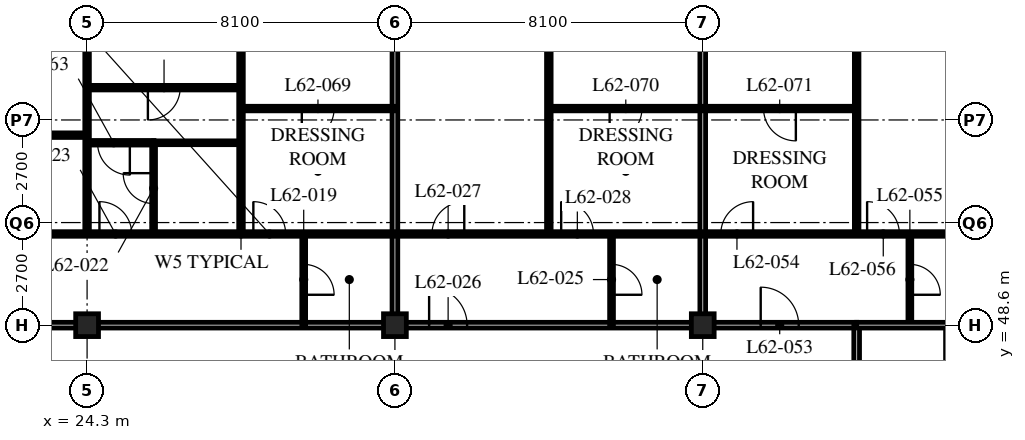
"""IFC4 building model, lengths in metres.
Left out: names, types, materials, properties, quantities, classifications, styles, units other than length and angle.
Written with IfcOpenShell. Run it as: python <this file> out.ifc"""

import sys

from ifc_helpers import new_model, si_unit, direction, frame, frame_2d, origin, origin_2d, place, context, subcontext, project, spatial, rectangle, hollow_rectangle, extrude, element, fill, save


model = new_model("IFC4")
c1 = context("Model", 3, precision=1e-05, world=origin(), true_north=direction((0.0, 1.0)))
c2 = subcontext(c1, "Body", "Model", "MODEL_VIEW")
j1 = project(units=[si_unit("LENGTHUNIT", "METRE"), si_unit("PLANEANGLEUNIT", "RADIAN")], contexts=[c1])
p1 = place(None, origin())
s1 = spatial("IfcSite", under=j1, at=p1, CompositionType="ELEMENT")
p2 = place(p1, origin())
s2 = spatial("IfcBuilding", under=s1, at=p2, CompositionType="ELEMENT")
p3 = place(p2, frame((0.0, 0.0, 242.4)))
s3 = spatial("IfcBuildingStorey", under=s2, at=p3, CompositionType="ELEMENT", Elevation=242.4)
for number, where, z_axis, x_axis in (
    (1, (24.3, 48.6, 0.0), (0.0, 0.0, 1.0), (1.0, 0.0, 0.0)),
    (2, (32.4, 48.6, 0.0), (0.0, 0.0, 1.0), (1.0, 0.0, 0.0)),
    (3, (40.5, 48.6, 0.0), (0.0, 0.0, 1.0), (1.0, 0.0, 0.0)),
):
    element("IfcColumn", number, at=place(p3, frame(where, z_axis=z_axis, x_axis=x_axis)), inside=s3, PredefinedType="COLUMN", context=c2, shape_type="SweptSolid", body=[
        extrude(hollow_rectangle(XDim=0.6, YDim=0.6, WallThickness=0.05, at=origin_2d()), origin(), (0.0, 0.0, 1.0), 3.9),
    ])
p4 = place(p3, frame((12.15, 48.6, 0.0), z_axis=(0.0, 0.0, 1.0), x_axis=(1.0, 0.0, 0.0)))
e4 = element("IfcWall", 4, at=p4, inside=s3, PredefinedType="PARTITIONING", context=c2, shape_type="SweptSolid", body=[
    extrude(rectangle(XDim=32.4, YDim=0.15, at=frame_2d((16.2, 0.0))), origin(), (0.0, 0.0, 1.0), 2.928),
])
p5 = place(p4, frame((4.95, 0.0, 0.0)))
e5 = element("IfcOpeningElement", 5, at=p5, cuts=e4, PredefinedType="OPENING", context=c2, shape_type="SweptSolid", body=[
    extrude(rectangle(XDim=1.0, YDim=2.1, at=frame_2d((0.5, 1.05))), frame((0.0, 0.085, 0.0), z_axis=(0.0, -1.0, 0.0), x_axis=(1.0, 0.0, 0.0)), (0.0, 0.0, 1.0), 0.17),
])
p6 = place(p4, frame((21.15, 0.0, 0.0)))
e6 = element("IfcOpeningElement", 6, at=p6, cuts=e4, PredefinedType="OPENING", context=c2, shape_type="SweptSolid", body=[
    extrude(rectangle(XDim=1.0, YDim=2.1, at=frame_2d((0.5, 1.05))), frame((0.0, 0.085, 0.0), z_axis=(0.0, -1.0, 0.0), x_axis=(1.0, 0.0, 0.0)), (0.0, 0.0, 1.0), 0.17),
])
p7 = place(p4, frame((29.875, 0.0, 0.0)))
e7 = element("IfcOpeningElement", 7, at=p7, cuts=e4, PredefinedType="OPENING", context=c2, shape_type="SweptSolid", body=[
    extrude(rectangle(XDim=1.0, YDim=2.1, at=frame_2d((0.5, 1.05))), frame((0.0, 0.085, 0.0), z_axis=(0.0, -1.0, 0.0), x_axis=(1.0, 0.0, 0.0)), (0.0, 0.0, 1.0), 0.17),
])
p8 = place(p4, frame((1.525, 0.0, 0.0)))
e8 = element("IfcOpeningElement", 8, at=p8, cuts=e4, PredefinedType="OPENING", context=c2, shape_type="SweptSolid", body=[
    extrude(rectangle(XDim=1.0, YDim=2.1, at=frame_2d((0.5, 1.05))), frame((0.0, 0.085, 0.0), z_axis=(0.0, -1.0, 0.0), x_axis=(1.0, 0.0, 0.0)), (0.0, 0.0, 1.0), 0.17),
])
p9 = place(p3, frame((44.55, 22.5, 0.0), z_axis=(0.0, 0.0, 1.0), x_axis=(0.0, 1.0, 0.0)))
e9 = element("IfcWall", 9, at=p9, inside=s3, PredefinedType="PARTITIONING", context=c2, shape_type="SweptSolid", body=[
    extrude(rectangle(XDim=26.1, YDim=0.15, at=frame_2d((13.05, 0.0))), origin(), (0.0, 0.0, 1.0), 3.69),
])
p10 = place(p9, frame((0.4, 0.0, 0.0)))
e10 = element("IfcOpeningElement", 10, at=p10, cuts=e9, PredefinedType="OPENING", context=c2, shape_type="SweptSolid", body=[
    extrude(rectangle(XDim=1.0, YDim=2.1, at=frame_2d((0.5, 1.05))), frame((0.0, 0.085, 0.0), z_axis=(0.0, -1.0, 0.0), x_axis=(1.0, 0.0, 0.0)), (0.0, 0.0, 1.0), 0.17),
])
p11 = place(p9, frame((10.3, 0.0, 0.0)))
e11 = element("IfcOpeningElement", 11, at=p11, cuts=e9, PredefinedType="OPENING", context=c2, shape_type="SweptSolid", body=[
    extrude(rectangle(XDim=1.0, YDim=2.1, at=frame_2d((0.5, 1.05))), frame((0.0, 0.085, 0.0), z_axis=(0.0, -1.0, 0.0), x_axis=(1.0, 0.0, 0.0)), (0.0, 0.0, 1.0), 0.17),
])
p12 = place(p3, frame((30.0, 48.6, 0.0), z_axis=(0.0, 0.0, 1.0), x_axis=(0.0, 1.0, 0.0)))
e12 = element("IfcWall", 12, at=p12, inside=s3, PredefinedType="PARTITIONING", context=c2, shape_type="SweptSolid", body=[
    extrude(rectangle(XDim=2.4, YDim=0.1, at=frame_2d((1.2, 0.0))), origin(), (0.0, 0.0, 1.0), 3.69),
])
p13 = place(p12, frame((0.8, 0.0, 0.0)))
e13 = element("IfcOpeningElement", 13, at=p13, cuts=e12, PredefinedType="OPENING", context=c2, shape_type="SweptSolid", body=[
    extrude(rectangle(XDim=0.8, YDim=2.1, at=frame_2d((0.4, 1.05))), frame((0.0, 0.06, 0.0), z_axis=(0.0, -1.0, 0.0), x_axis=(1.0, 0.0, 0.0)), (0.0, 0.0, 1.0), 0.12),
])
p14 = place(p3, frame((26.05, 51.0, 0.0), z_axis=(0.0, 0.0, 1.0), x_axis=(0.0, 1.0, 0.0)))
e14 = element("IfcWall", 14, at=p14, inside=s3, PredefinedType="PARTITIONING", context=c2, shape_type="SweptSolid", body=[
    extrude(rectangle(XDim=2.4, YDim=0.1, at=frame_2d((1.2, 0.0))), origin(), (0.0, 0.0, 1.0), 3.69),
])
p15 = place(p14, frame((0.8, 0.0, 0.0)))
e15 = element("IfcOpeningElement", 15, at=p15, cuts=e14, PredefinedType="OPENING", context=c2, shape_type="SweptSolid", body=[
    extrude(rectangle(XDim=0.8, YDim=2.1, at=frame_2d((0.4, 1.05))), frame((0.0, 0.06, 0.0), z_axis=(0.0, -1.0, 0.0), x_axis=(1.0, 0.0, 0.0)), (0.0, 0.0, 1.0), 0.12),
])
p16 = place(p3, frame((26.05, 53.4, 0.0), z_axis=(0.0, 0.0, 1.0), x_axis=(1.0, 0.0, 0.0)))
e16 = element("IfcWall", 16, at=p16, inside=s3, PredefinedType="PARTITIONING", context=c2, shape_type="SweptSolid", body=[
    extrude(rectangle(XDim=2.3, YDim=0.1, at=frame_2d((1.15, 0.0))), origin(), (0.0, 0.0, 1.0), 3.69),
])
p17 = place(p3, frame((24.3, 51.0, 0.0), z_axis=(0.0, 0.0, 1.0), x_axis=(0.0, 1.0, 0.0)))
e17 = element("IfcWall", 17, at=p17, inside=s3, PredefinedType="PARTITIONING", context=c2, shape_type="SweptSolid", body=[
    extrude(rectangle(XDim=13.5, YDim=0.12, at=frame_2d((6.75, 0.0))), origin(), (0.0, 0.0, 1.0), 2.928),
])
p18 = place(p3, frame((28.35, 51.0, 0.0), z_axis=(0.0, 0.0, 1.0), x_axis=(0.0, 1.0, 0.0)))
e18 = element("IfcWall", 18, at=p18, inside=s3, PredefinedType="PARTITIONING", context=c2, shape_type="SweptSolid", body=[
    extrude(rectangle(XDim=13.5, YDim=0.12, at=frame_2d((6.75, 0.0))), origin(), (0.0, 0.0, 1.0), 3.69),
])
p19 = place(p3, frame((32.4, 48.6, 0.0), z_axis=(0.0, 0.0, 1.0), x_axis=(0.0, 1.0, 0.0)))
e19 = element("IfcWall", 19, at=p19, inside=s3, PredefinedType="PARTITIONING", context=c2, shape_type="SweptSolid", body=[
    extrude(rectangle(XDim=15.9, YDim=0.15, at=frame_2d((7.95, 0.0))), origin(), (0.0, 0.0, 1.0), 2.928),
])
p20 = place(p3, frame((38.1, 48.6, 0.0), z_axis=(0.0, 0.0, 1.0), x_axis=(0.0, 1.0, 0.0)))
e20 = element("IfcWall", 20, at=p20, inside=s3, PredefinedType="PARTITIONING", context=c2, shape_type="SweptSolid", body=[
    extrude(rectangle(XDim=2.4, YDim=0.1, at=frame_2d((1.2, 0.0))), origin(), (0.0, 0.0, 1.0), 3.69),
])
p21 = place(p20, frame((0.8, 0.0, 0.0)))
e21 = element("IfcOpeningElement", 21, at=p21, cuts=e20, PredefinedType="OPENING", context=c2, shape_type="SweptSolid", body=[
    extrude(rectangle(XDim=0.8, YDim=2.1, at=frame_2d((0.4, 1.05))), frame((0.0, 0.06, 0.0), z_axis=(0.0, -1.0, 0.0), x_axis=(1.0, 0.0, 0.0)), (0.0, 0.0, 1.0), 0.12),
])
p22 = place(p3, frame((36.45, 51.0, 0.0), z_axis=(0.0, 0.0, 1.0), x_axis=(0.0, 1.0, 0.0)))
e22 = element("IfcWall", 22, at=p22, inside=s3, PredefinedType="PARTITIONING", context=c2, shape_type="SweptSolid", body=[
    extrude(rectangle(XDim=13.5, YDim=0.12, at=frame_2d((6.75, 0.0))), origin(), (0.0, 0.0, 1.0), 3.69),
])
p23 = place(p3, frame((45.95, 48.6, 0.0), z_axis=(0.0, 0.0, 1.0), x_axis=(0.0, 1.0, 0.0)))
e23 = element("IfcWall", 23, at=p23, inside=s3, PredefinedType="PARTITIONING", context=c2, shape_type="SweptSolid", body=[
    extrude(rectangle(XDim=2.4, YDim=0.1, at=frame_2d((1.2, 0.0))), origin(), (0.0, 0.0, 1.0), 3.69),
])
p24 = place(p23, frame((0.8, 0.0, 0.0)))
e24 = element("IfcOpeningElement", 24, at=p24, cuts=e23, PredefinedType="OPENING", context=c2, shape_type="SweptSolid", body=[
    extrude(rectangle(XDim=0.8, YDim=2.1, at=frame_2d((0.4, 1.05))), frame((0.0, 0.06, 0.0), z_axis=(0.0, -1.0, 0.0), x_axis=(1.0, 0.0, 0.0)), (0.0, 0.0, 1.0), 0.12),
])
p25 = place(p3, frame((44.55, 51.0, 0.0), z_axis=(0.0, 0.0, 1.0), x_axis=(0.0, 1.0, 0.0)))
e25 = element("IfcWall", 25, at=p25, inside=s3, PredefinedType="PARTITIONING", context=c2, shape_type="SweptSolid", body=[
    extrude(rectangle(XDim=13.5, YDim=0.12, at=frame_2d((6.75, 0.0))), origin(), (0.0, 0.0, 1.0), 3.69),
])
p26 = place(p3, frame((44.55, 48.6, 0.0), z_axis=(0.0, 0.0, 1.0), x_axis=(1.0, 0.0, 0.0)))
e26 = element("IfcWall", 26, at=p26, inside=s3, PredefinedType="PARTITIONING", context=c2, shape_type="SweptSolid", body=[
    extrude(rectangle(XDim=11.85, YDim=0.15, at=frame_2d((5.925, 0.0))), origin(), (0.0, 0.0, 1.0), 2.928),
])
p27 = place(p3, frame((40.5, 48.6, 0.0), z_axis=(0.0, 0.0, 1.0), x_axis=(0.0, 1.0, 0.0)))
e27 = element("IfcWall", 27, at=p27, inside=s3, PredefinedType="PARTITIONING", context=c2, shape_type="SweptSolid", body=[
    extrude(rectangle(XDim=15.9, YDim=0.15, at=frame_2d((7.95, 0.0))), origin(), (0.0, 0.0, 1.0), 2.928),
])
p28 = place(p3, frame((8.15, 51.0, 0.0), z_axis=(0.0, 0.0, 1.0), x_axis=(1.0, 0.0, 0.0)))
e28 = element("IfcWall", 28, at=p28, inside=s3, PredefinedType="PARTITIONING", context=c2, shape_type="SweptSolid", body=[
    extrude(rectangle(XDim=40.4, YDim=0.12, at=frame_2d((20.2, 0.0))), origin(), (0.0, 0.0, 1.0), 3.69),
])
p29 = place(p28, frame((9.025, 0.0, 0.0)))
e29 = element("IfcOpeningElement", 29, at=p29, cuts=e28, PredefinedType="OPENING", context=c2, shape_type="SweptSolid", body=[
    extrude(rectangle(XDim=0.85, YDim=2.1, at=frame_2d((0.425, 1.05))), frame((0.0, 0.07, 0.0), z_axis=(0.0, -1.0, 0.0), x_axis=(1.0, 0.0, 0.0)), (0.0, 0.0, 1.0), 0.14),
])
p30 = place(p28, frame((16.475, 0.0, 0.0)))
e30 = element("IfcOpeningElement", 30, at=p30, cuts=e28, PredefinedType="OPENING", context=c2, shape_type="SweptSolid", body=[
    extrude(rectangle(XDim=0.85, YDim=2.1, at=frame_2d((0.425, 1.05))), frame((0.0, 0.07, 0.0), z_axis=(0.0, -1.0, 0.0), x_axis=(1.0, 0.0, 0.0)), (0.0, 0.0, 1.0), 0.14),
])
p31 = place(p28, frame((20.525, 0.0, 0.0)))
e31 = element("IfcOpeningElement", 31, at=p31, cuts=e28, PredefinedType="OPENING", context=c2, shape_type="SweptSolid", body=[
    extrude(rectangle(XDim=0.85, YDim=2.1, at=frame_2d((0.425, 1.05))), frame((0.0, 0.07, 0.0), z_axis=(0.0, -1.0, 0.0), x_axis=(1.0, 0.0, 0.0)), (0.0, 0.0, 1.0), 0.14),
])
p32 = place(p28, frame((25.225, 0.0, 0.0)))
e32 = element("IfcOpeningElement", 32, at=p32, cuts=e28, PredefinedType="OPENING", context=c2, shape_type="SweptSolid", body=[
    extrude(rectangle(XDim=0.85, YDim=2.1, at=frame_2d((0.425, 1.05))), frame((0.0, 0.07, 0.0), z_axis=(0.0, -1.0, 0.0), x_axis=(1.0, 0.0, 0.0)), (0.0, 0.0, 1.0), 0.14),
])
p33 = place(p28, frame((28.625, 0.0, 0.0)))
e33 = element("IfcOpeningElement", 33, at=p33, cuts=e28, PredefinedType="OPENING", context=c2, shape_type="SweptSolid", body=[
    extrude(rectangle(XDim=0.85, YDim=2.1, at=frame_2d((0.425, 1.05))), frame((0.0, 0.07, 0.0), z_axis=(0.0, -1.0, 0.0), x_axis=(1.0, 0.0, 0.0)), (0.0, 0.0, 1.0), 0.14),
])
p34 = place(p28, frame((32.825, 0.0, 0.0)))
e34 = element("IfcOpeningElement", 34, at=p34, cuts=e28, PredefinedType="OPENING", context=c2, shape_type="SweptSolid", body=[
    extrude(rectangle(XDim=0.85, YDim=2.1, at=frame_2d((0.425, 1.05))), frame((0.0, 0.07, 0.0), z_axis=(0.0, -1.0, 0.0), x_axis=(1.0, 0.0, 0.0)), (0.0, 0.0, 1.0), 0.14),
])
p35 = place(p28, frame((36.675, 0.0, 0.0)))
e35 = element("IfcOpeningElement", 35, at=p35, cuts=e28, PredefinedType="OPENING", context=c2, shape_type="SweptSolid", body=[
    extrude(rectangle(XDim=0.85, YDim=2.1, at=frame_2d((0.425, 1.05))), frame((0.0, 0.07, 0.0), z_axis=(0.0, -1.0, 0.0), x_axis=(1.0, 0.0, 0.0)), (0.0, 0.0, 1.0), 0.14),
])
p36 = place(p28, frame((6.725, 0.0, 0.0)))
e36 = element("IfcOpeningElement", 36, at=p36, cuts=e28, PredefinedType="OPENING", context=c2, shape_type="SweptSolid", body=[
    extrude(rectangle(XDim=0.85, YDim=2.1, at=frame_2d((0.425, 1.05))), frame((0.0, 0.07, 0.0), z_axis=(0.0, -1.0, 0.0), x_axis=(1.0, 0.0, 0.0)), (0.0, 0.0, 1.0), 0.14),
])
p37 = place(p28, frame((2.875, 0.0, 0.0)))
e37 = element("IfcOpeningElement", 37, at=p37, cuts=e28, PredefinedType="OPENING", context=c2, shape_type="SweptSolid", body=[
    extrude(rectangle(XDim=0.85, YDim=2.1, at=frame_2d((0.425, 1.05))), frame((0.0, 0.07, 0.0), z_axis=(0.0, -1.0, 0.0), x_axis=(1.0, 0.0, 0.0)), (0.0, 0.0, 1.0), 0.14),
])
p38 = place(p3, frame((24.3, 53.4, 0.0), z_axis=(0.0, 0.0, 1.0), x_axis=(1.0, 0.0, 0.0)))
e38 = element("IfcWall", 38, at=p38, inside=s3, PredefinedType="PARTITIONING", context=c2, shape_type="SweptSolid", body=[
    extrude(rectangle(XDim=1.76, YDim=0.12, at=frame_2d((0.88, 0.0))), origin(), (0.0, 0.0, 1.0), 3.69),
])
p39 = place(p38, frame((0.275, 0.0, 0.0)))
e39 = element("IfcOpeningElement", 39, at=p39, cuts=e38, PredefinedType="OPENING", context=c2, shape_type="SweptSolid", body=[
    extrude(rectangle(XDim=0.85, YDim=2.1, at=frame_2d((0.425, 1.05))), frame((0.0, 0.07, 0.0), z_axis=(0.0, -1.0, 0.0), x_axis=(1.0, 0.0, 0.0)), (0.0, 0.0, 1.0), 0.14),
])
p40 = place(p3, frame((16.2, 53.6, 0.0), z_axis=(0.0, 0.0, 1.0), x_axis=(1.0, 0.0, 0.0)))
e40 = element("IfcWall", 40, at=p40, inside=s3, PredefinedType="PARTITIONING", context=c2, shape_type="SweptSolid", body=[
    extrude(rectangle(XDim=8.1, YDim=0.12, at=frame_2d((4.05, 0.0))), origin(), (0.0, 0.0, 1.0), 3.69),
])
p41 = place(p40, frame((3.625, 0.0, 0.0)))
e41 = element("IfcOpeningElement", 41, at=p41, cuts=e40, PredefinedType="OPENING", context=c2, shape_type="SweptSolid", body=[
    extrude(rectangle(XDim=0.85, YDim=2.1, at=frame_2d((0.425, 1.05))), frame((0.0, 0.07, 0.0), z_axis=(0.0, -1.0, 0.0), x_axis=(1.0, 0.0, 0.0)), (0.0, 0.0, 1.0), 0.14),
])
p42 = place(p3, frame((24.3, 54.85, 0.0), z_axis=(0.0, 0.0, 1.0), x_axis=(1.0, 0.0, 0.0)))
e42 = element("IfcWall", 42, at=p42, inside=s3, PredefinedType="PARTITIONING", context=c2, shape_type="SweptSolid", body=[
    extrude(rectangle(XDim=4.05, YDim=0.12, at=frame_2d((2.025, 0.0))), origin(), (0.0, 0.0, 1.0), 3.69),
])
p43 = place(p42, frame((1.6, 0.0, 0.0)))
e43 = element("IfcOpeningElement", 43, at=p43, cuts=e42, PredefinedType="OPENING", context=c2, shape_type="SweptSolid", body=[
    extrude(rectangle(XDim=0.85, YDim=2.1, at=frame_2d((0.425, 1.05))), frame((0.0, 0.07, 0.0), z_axis=(0.0, -1.0, 0.0), x_axis=(1.0, 0.0, 0.0)), (0.0, 0.0, 1.0), 0.14),
])
p44 = place(p3, frame((28.35, 54.3, 0.0), z_axis=(0.0, 0.0, 1.0), x_axis=(1.0, 0.0, 0.0)))
e44 = element("IfcWall", 44, at=p44, inside=s3, PredefinedType="PARTITIONING", context=c2, shape_type="SweptSolid", body=[
    extrude(rectangle(XDim=4.05, YDim=0.12, at=frame_2d((2.025, 0.0))), origin(), (0.0, 0.0, 1.0), 3.69),
])
p45 = place(p44, frame((1.6, 0.0, 0.0)))
e45 = element("IfcOpeningElement", 45, at=p45, cuts=e44, PredefinedType="OPENING", context=c2, shape_type="SweptSolid", body=[
    extrude(rectangle(XDim=0.85, YDim=2.1, at=frame_2d((0.425, 1.05))), frame((0.0, 0.07, 0.0), z_axis=(0.0, -1.0, 0.0), x_axis=(1.0, 0.0, 0.0)), (0.0, 0.0, 1.0), 0.14),
])
p46 = place(p3, frame((36.45, 54.3, 0.0), z_axis=(0.0, 0.0, 1.0), x_axis=(1.0, 0.0, 0.0)))
e46 = element("IfcWall", 46, at=p46, inside=s3, PredefinedType="PARTITIONING", context=c2, shape_type="SweptSolid", body=[
    extrude(rectangle(XDim=8.1, YDim=0.12, at=frame_2d((4.05, 0.0))), origin(), (0.0, 0.0, 1.0), 3.69),
])
p47 = place(p46, frame((1.6, 0.0, 0.0)))
e47 = element("IfcOpeningElement", 47, at=p47, cuts=e46, PredefinedType="OPENING", context=c2, shape_type="SweptSolid", body=[
    extrude(rectangle(XDim=0.85, YDim=2.1, at=frame_2d((0.425, 1.05))), frame((0.0, 0.07, 0.0), z_axis=(0.0, -1.0, 0.0), x_axis=(1.0, 0.0, 0.0)), (0.0, 0.0, 1.0), 0.14),
])
p48 = place(p46, frame((5.65, 0.0, 0.0)))
e48 = element("IfcOpeningElement", 48, at=p48, cuts=e46, PredefinedType="OPENING", context=c2, shape_type="SweptSolid", body=[
    extrude(rectangle(XDim=0.85, YDim=2.1, at=frame_2d((0.425, 1.05))), frame((0.0, 0.07, 0.0), z_axis=(0.0, -1.0, 0.0), x_axis=(1.0, 0.0, 0.0)), (0.0, 0.0, 1.0), 0.14),
])
p49 = place(p13, origin())
e49 = element("IfcDoor", 49, at=p49, inside=s3, OperationType="SINGLE_SWING_RIGHT", PredefinedType="DOOR", context=c2, shape_type="SweptSolid", body=[
    extrude(rectangle(XDim=0.8, YDim=2.1, at=frame_2d((0.4, 1.05))), frame((0.0, 0.025, 0.0), z_axis=(0.0, -1.0, 0.0), x_axis=(1.0, 0.0, 0.0)), (0.0, 0.0, 1.0), 0.05),
])
fill(e13, e49)
p50 = place(p15, origin())
e50 = element("IfcDoor", 50, at=p50, inside=s3, OperationType="SINGLE_SWING_RIGHT", PredefinedType="DOOR", context=c2, shape_type="SweptSolid", body=[
    extrude(rectangle(XDim=0.8, YDim=2.1, at=frame_2d((0.4, 1.05))), frame((0.0, 0.025, 0.0), z_axis=(0.0, -1.0, 0.0), x_axis=(1.0, 0.0, 0.0)), (0.0, 0.0, 1.0), 0.05),
])
fill(e15, e50)
p51 = place(p30, origin())
e51 = element("IfcDoor", 51, at=p51, inside=s3, OperationType="SINGLE_SWING_LEFT", PredefinedType="DOOR", context=c2, shape_type="SweptSolid", body=[
    extrude(rectangle(XDim=0.85, YDim=2.1, at=frame_2d((0.425, 1.05))), frame((0.0, 0.025, 0.0), z_axis=(0.0, -1.0, 0.0), x_axis=(1.0, 0.0, 0.0)), (0.0, 0.0, 1.0), 0.05),
])
fill(e30, e51)
p52 = place(p31, origin())
e52 = element("IfcDoor", 52, at=p52, inside=s3, OperationType="SINGLE_SWING_LEFT", PredefinedType="DOOR", context=c2, shape_type="SweptSolid", body=[
    extrude(rectangle(XDim=0.85, YDim=2.1, at=frame_2d((0.425, 1.05))), frame((0.0, 0.025, 0.0), z_axis=(0.0, -1.0, 0.0), x_axis=(1.0, 0.0, 0.0)), (0.0, 0.0, 1.0), 0.05),
])
fill(e31, e52)
p53 = place(p21, origin())
e53 = element("IfcDoor", 53, at=p53, inside=s3, OperationType="SINGLE_SWING_RIGHT", PredefinedType="DOOR", context=c2, shape_type="SweptSolid", body=[
    extrude(rectangle(XDim=0.8, YDim=2.1, at=frame_2d((0.4, 1.05))), frame((0.0, 0.025, 0.0), z_axis=(0.0, -1.0, 0.0), x_axis=(1.0, 0.0, 0.0)), (0.0, 0.0, 1.0), 0.05),
])
fill(e21, e53)
p54 = place(p6, origin())
e54 = element("IfcDoor", 54, at=p54, inside=s3, OperationType="SINGLE_SWING_LEFT", PredefinedType="DOOR", context=c2, shape_type="SweptSolid", body=[
    extrude(rectangle(XDim=1.0, YDim=2.1, at=frame_2d((0.5, 1.05))), frame((0.0, 0.025, 0.0), z_axis=(0.0, -1.0, 0.0), x_axis=(1.0, 0.0, 0.0)), (0.0, 0.0, 1.0), 0.05),
])
fill(e6, e54)
p55 = place(p32, origin())
e55 = element("IfcDoor", 55, at=p55, inside=s3, OperationType="SINGLE_SWING_RIGHT", PredefinedType="DOOR", context=c2, shape_type="SweptSolid", body=[
    extrude(rectangle(XDim=0.85, YDim=2.1, at=frame_2d((0.425, 1.05))), frame((0.0, 0.025, 0.0), z_axis=(0.0, -1.0, 0.0), x_axis=(1.0, 0.0, 0.0)), (0.0, 0.0, 1.0), 0.05),
])
fill(e32, e55)
p56 = place(p33, origin())
e56 = element("IfcDoor", 56, at=p56, inside=s3, OperationType="SINGLE_SWING_LEFT", PredefinedType="DOOR", context=c2, shape_type="SweptSolid", body=[
    extrude(rectangle(XDim=0.85, YDim=2.1, at=frame_2d((0.425, 1.05))), frame((0.0, 0.025, 0.0), z_axis=(0.0, -1.0, 0.0), x_axis=(1.0, 0.0, 0.0)), (0.0, 0.0, 1.0), 0.05),
])
fill(e33, e56)
p57 = place(p7, origin())
e57 = element("IfcDoor", 57, at=p57, inside=s3, OperationType="SINGLE_SWING_LEFT", PredefinedType="DOOR", context=c2, shape_type="SweptSolid", body=[
    extrude(rectangle(XDim=1.0, YDim=2.1, at=frame_2d((0.5, 1.05))), frame((0.0, 0.025, 0.0), z_axis=(0.0, -1.0, 0.0), x_axis=(1.0, 0.0, 0.0)), (0.0, 0.0, 1.0), 0.05),
])
fill(e7, e57)
p58 = place(p34, origin())
e58 = element("IfcDoor", 58, at=p58, inside=s3, OperationType="SINGLE_SWING_RIGHT", PredefinedType="DOOR", context=c2, shape_type="SweptSolid", body=[
    extrude(rectangle(XDim=0.85, YDim=2.1, at=frame_2d((0.425, 1.05))), frame((0.0, 0.025, 0.0), z_axis=(0.0, -1.0, 0.0), x_axis=(1.0, 0.0, 0.0)), (0.0, 0.0, 1.0), 0.05),
])
fill(e34, e58)
p59 = place(p24, origin())
e59 = element("IfcDoor", 59, at=p59, inside=s3, OperationType="SINGLE_SWING_RIGHT", PredefinedType="DOOR", context=c2, shape_type="SweptSolid", body=[
    extrude(rectangle(XDim=0.8, YDim=2.1, at=frame_2d((0.4, 1.05))), frame((0.0, 0.025, 0.0), z_axis=(0.0, -1.0, 0.0), x_axis=(1.0, 0.0, 0.0)), (0.0, 0.0, 1.0), 0.05),
])
fill(e24, e59)
p60 = place(p35, origin())
e60 = element("IfcDoor", 60, at=p60, inside=s3, OperationType="SINGLE_SWING_LEFT", PredefinedType="DOOR", context=c2, shape_type="SweptSolid", body=[
    extrude(rectangle(XDim=0.85, YDim=2.1, at=frame_2d((0.425, 1.05))), frame((0.0, 0.025, 0.0), z_axis=(0.0, -1.0, 0.0), x_axis=(1.0, 0.0, 0.0)), (0.0, 0.0, 1.0), 0.05),
])
fill(e35, e60)
p61 = place(p39, origin())
e61 = element("IfcDoor", 61, at=p61, inside=s3, OperationType="SINGLE_SWING_LEFT", PredefinedType="DOOR", context=c2, shape_type="SweptSolid", body=[
    extrude(rectangle(XDim=0.85, YDim=2.1, at=frame_2d((0.425, 1.05))), frame((0.0, 0.025, 0.0), z_axis=(0.0, -1.0, 0.0), x_axis=(1.0, 0.0, 0.0)), (0.0, 0.0, 1.0), 0.05),
])
fill(e39, e61)
p62 = place(p43, origin())
e62 = element("IfcDoor", 62, at=p62, inside=s3, OperationType="SINGLE_SWING_RIGHT", PredefinedType="DOOR", context=c2, shape_type="SweptSolid", body=[
    extrude(rectangle(XDim=0.85, YDim=2.1, at=frame_2d((0.425, 1.05))), frame((0.0, 0.025, 0.0), z_axis=(0.0, -1.0, 0.0), x_axis=(1.0, 0.0, 0.0)), (0.0, 0.0, 1.0), 0.05),
])
fill(e43, e62)
p63 = place(p45, origin())
e63 = element("IfcDoor", 63, at=p63, inside=s3, OperationType="SINGLE_SWING_RIGHT", PredefinedType="DOOR", context=c2, shape_type="SweptSolid", body=[
    extrude(rectangle(XDim=0.85, YDim=2.1, at=frame_2d((0.425, 1.05))), frame((0.0, 0.025, 0.0), z_axis=(0.0, -1.0, 0.0), x_axis=(1.0, 0.0, 0.0)), (0.0, 0.0, 1.0), 0.05),
])
fill(e45, e63)
p64 = place(p47, origin())
e64 = element("IfcDoor", 64, at=p64, inside=s3, OperationType="SINGLE_SWING_RIGHT", PredefinedType="DOOR", context=c2, shape_type="SweptSolid", body=[
    extrude(rectangle(XDim=0.85, YDim=2.1, at=frame_2d((0.425, 1.05))), frame((0.0, 0.025, 0.0), z_axis=(0.0, -1.0, 0.0), x_axis=(1.0, 0.0, 0.0)), (0.0, 0.0, 1.0), 0.05),
])
fill(e47, e64)
p65 = place(p48, origin())
e65 = element("IfcDoor", 65, at=p65, inside=s3, OperationType="SINGLE_SWING_LEFT", PredefinedType="DOOR", context=c2, shape_type="SweptSolid", body=[
    extrude(rectangle(XDim=0.85, YDim=2.1, at=frame_2d((0.425, 1.05))), frame((0.0, 0.025, 0.0), z_axis=(0.0, -1.0, 0.0), x_axis=(1.0, 0.0, 0.0)), (0.0, 0.0, 1.0), 0.05),
])
fill(e48, e65)
save(model, sys.argv[1])
